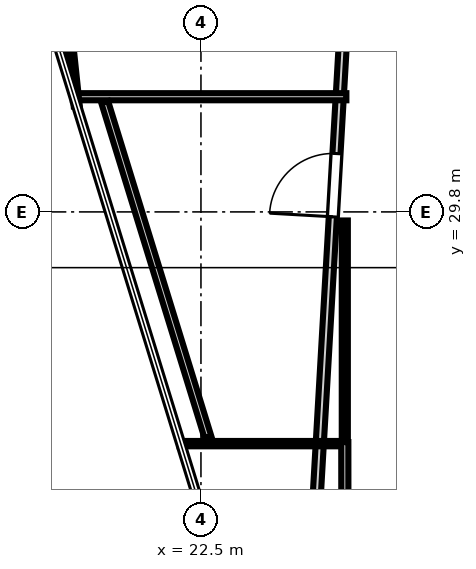
"""IFC4 building model, lengths in metres.
Left out: names, types, materials, properties, quantities, classifications, styles, units other than length and angle.
Written with IfcOpenShell. Run it as: python <this file> out.ifc"""

import sys

from ifc_helpers import new_model, si_unit, direction, frame, frame_2d, origin, place, context, subcontext, project, spatial, rectangle, extrude, element, fill, save


model = new_model("IFC4")
c1 = context("Model", 3, precision=1e-05, world=origin(), true_north=direction((0.0, 1.0)))
c2 = subcontext(c1, "Body", "Model", "MODEL_VIEW")
j1 = project(units=[si_unit("LENGTHUNIT", "METRE"), si_unit("PLANEANGLEUNIT", "RADIAN")], contexts=[c1])
p1 = place(None, origin())
s1 = spatial("IfcSite", under=j1, at=p1, CompositionType="ELEMENT")
p2 = place(p1, origin())
s2 = spatial("IfcBuilding", under=s1, at=p2, CompositionType="ELEMENT")
p3 = place(p2, frame((0.0, 0.0, 218.8)))
s3 = spatial("IfcBuildingStorey", under=s2, at=p3, CompositionType="ELEMENT", Elevation=218.8)
p4 = place(p3, frame((24.413, 17.721, 0.0), z_axis=(0.0, 0.0, 1.0), x_axis=(0.057505607696, 0.998345183333, 0.0)))
e1 = element("IfcWall", 1, at=p4, inside=s3, PredefinedType="PARTITIONING", context=c2, shape_type="SweptSolid", body=[
    extrude(rectangle(XDim=18.578, YDim=0.16, at=frame_2d((9.289, 0.0))), origin(), (0.0, 0.0, 1.0), 2.84),
])
p5 = place(p4, frame((15.461, 0.0, 0.0)))
e2 = element("IfcOpeningElement", 2, at=p5, cuts=e1, PredefinedType="OPENING", context=c2, shape_type="SweptSolid", body=[
    extrude(rectangle(XDim=1.25, YDim=2.2, at=frame_2d((0.625, 1.1))), frame((0.0, 0.09, 0.0), z_axis=(0.0, -1.0, 0.0), x_axis=(1.0, 0.0, 0.0)), (0.0, 0.0, 1.0), 0.18),
])
p6 = place(p4, frame((12.002, 0.0, 0.0)))
e3 = element("IfcOpeningElement", 3, at=p6, cuts=e1, PredefinedType="OPENING", context=c2, shape_type="SweptSolid", body=[
    extrude(rectangle(XDim=1.25, YDim=2.2, at=frame_2d((0.625, 1.1))), frame((0.0, 0.09, 0.0), z_axis=(0.0, -1.0, 0.0), x_axis=(1.0, 0.0, 0.0)), (0.0, 0.0, 1.0), 0.18),
])
p7 = place(p3, frame((22.08, 25.227, 0.0), z_axis=(0.0, 0.0, 1.0), x_axis=(1.0, 0.0, 0.0)))
e4 = element("IfcWall", 4, at=p7, inside=s3, PredefinedType="PARTITIONING", context=c2, shape_type="SweptSolid", body=[
    extrude(rectangle(XDim=3.29, YDim=0.105, at=frame_2d((1.645, 0.0))), origin(), (0.0, 0.0, 1.0), 2.84),
])
p8 = place(p3, frame((25.339, 25.258, 0.0), z_axis=(0.0, 0.0, 1.0), x_axis=(0.00083495657, -0.999999651424, 0.0)))
e5 = element("IfcWall", 5, at=p8, inside=s3, PredefinedType="PARTITIONING", context=c2, shape_type="SweptSolid", body=[
    extrude(rectangle(XDim=2.632, YDim=0.14, at=frame_2d((1.316, 0.0))), origin(), (0.0, 0.0, 1.0), 2.84),
])
p9 = place(p3, frame((25.37, 32.073, 0.0), z_axis=(0.0, 0.0, 1.0), x_axis=(-1.0, 0.0, 0.0)))
e6 = element("IfcWall", 6, at=p9, inside=s3, PredefinedType="PARTITIONING", context=c2, shape_type="SweptSolid", body=[
    extrude(rectangle(XDim=5.398, YDim=0.14, at=frame_2d((2.699, 0.0))), origin(), (0.0, 0.0, 1.0), 2.84),
])
p10 = place(p3, frame((20.048, 31.889, 0.0), z_axis=(0.0, 0.0, 1.0), x_axis=(-0.104435651057, 0.994531645946, 0.0)))
e7 = element("IfcWall", 7, at=p10, inside=s3, PredefinedType="PARTITIONING", context=c2, shape_type="SweptSolid", body=[
    extrude(rectangle(XDim=2.857, YDim=0.12, at=frame_2d((1.428, 0.0))), origin(), (0.0, 0.0, 1.0), 2.84),
])
p11 = place(p3, frame((25.339, 29.631, 0.0), z_axis=(0.0, 0.0, 1.0), x_axis=(0.0, -1.0, 0.0)))
e8 = element("IfcWall", 8, at=p11, inside=s3, PredefinedType="PARTITIONING", context=c2, shape_type="SweptSolid", body=[
    extrude(rectangle(XDim=4.289, YDim=0.12, at=frame_2d((2.144, 0.0))), origin(), (0.0, 0.0, 1.0), 2.84),
])
p12 = place(p3, frame((22.639, 25.351, 0.0), z_axis=(0.0, 0.0, 1.0), x_axis=(-0.29437082852, 0.955691276154, 0.0)))
e9 = element("IfcWall", 9, at=p12, inside=s3, PredefinedType="PARTITIONING", context=c2, shape_type="SweptSolid", body=[
    extrude(rectangle(XDim=6.923, YDim=0.14, at=frame_2d((3.461, 0.0))), origin(), (0.0, 0.0, 1.0), 2.84),
])
p13 = place(p6, origin())
e10 = element("IfcDoor", 10, at=p13, inside=s3, OperationType="SINGLE_SWING_LEFT", PredefinedType="DOOR", context=c2, shape_type="SweptSolid", body=[
    extrude(rectangle(XDim=1.25, YDim=2.2, at=frame_2d((0.625, 1.1))), frame((0.0, 0.025, 0.0), z_axis=(0.0, -1.0, 0.0), x_axis=(1.0, 0.0, 0.0)), (0.0, 0.0, 1.0), 0.05),
])
fill(e3, e10)
save(model, sys.argv[1])
